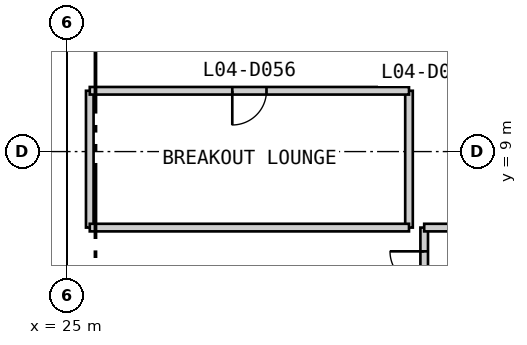
"""IFC4 building model, lengths in metres.
Left out: names, types, materials, properties, quantities, classifications, styles, units other than length and angle.
Written with IfcOpenShell. Run it as: python <this file> out.ifc"""

import sys

from ifc_helpers import new_model, si_unit, direction, frame, frame_2d, origin, place, context, subcontext, project, spatial, rectangle, extrude, element, fill, save


model = new_model("IFC4")
c1 = context("Model", 3, precision=1e-05, world=origin(), true_north=direction((0.0, 1.0)))
c2 = subcontext(c1, "Body", "Model", "MODEL_VIEW")
j1 = project(units=[si_unit("LENGTHUNIT", "METRE"), si_unit("PLANEANGLEUNIT", "RADIAN")], contexts=[c1])
p1 = place(None, origin())
s1 = spatial("IfcSite", under=j1, at=p1, CompositionType="ELEMENT")
p2 = place(p1, origin())
s2 = spatial("IfcBuilding", under=s1, at=p2, CompositionType="ELEMENT")
p3 = place(p2, frame((0.0, 0.0, 21.4)))
s3 = spatial("IfcBuildingStorey", under=s2, at=p3, CompositionType="ELEMENT", Elevation=21.4)
p4 = place(p3, frame((25.6, 7.0, 0.0), z_axis=(0.0, 0.0, 1.0), x_axis=(0.0, 1.0, 0.0)))
e1 = element("IfcWall", 1, at=p4, inside=s3, PredefinedType="PARTITIONING", context=c2, shape_type="SweptSolid", body=[
    extrude(rectangle(XDim=3.6, YDim=0.2, at=frame_2d((1.8, 0.0))), origin(), (0.0, 0.0, 1.0), 4.5),
])
p5 = place(p3, frame((34.0, 7.0, 0.0), z_axis=(0.0, 0.0, 1.0), x_axis=(0.0, 1.0, 0.0)))
e2 = element("IfcWall", 2, at=p5, inside=s3, PredefinedType="PARTITIONING", context=c2, shape_type="SweptSolid", body=[
    extrude(rectangle(XDim=3.6, YDim=0.2, at=frame_2d((1.8, 0.0))), origin(), (0.0, 0.0, 1.0), 3.843),
])
p6 = place(p3, frame((34.4, -7.25, 0.0), z_axis=(0.0, 0.0, 1.0), x_axis=(0.0, 1.0, 0.0)))
e3 = element("IfcWall", 3, at=p6, inside=s3, PredefinedType="PARTITIONING", context=c2, shape_type="SweptSolid", body=[
    extrude(rectangle(XDim=14.25, YDim=0.2, at=frame_2d((7.125, 0.0))), origin(), (0.0, 0.0, 1.0), 4.5),
])
p7 = place(p6, frame((2.45, 0.0, 0.0)))
e4 = element("IfcOpeningElement", 4, at=p7, cuts=e3, PredefinedType="OPENING", context=c2, shape_type="SweptSolid", body=[
    extrude(rectangle(XDim=1.8, YDim=2.4, at=frame_2d((0.9, 1.2))), frame((0.0, 0.11, 0.0), z_axis=(0.0, -1.0, 0.0), x_axis=(1.0, 0.0, 0.0)), (0.0, 0.0, 1.0), 0.22),
])
p8 = place(p6, frame((11.825, 0.0, 0.0)))
e5 = element("IfcOpeningElement", 5, at=p8, cuts=e3, PredefinedType="OPENING", context=c2, shape_type="SweptSolid", body=[
    extrude(rectangle(XDim=1.8, YDim=2.4, at=frame_2d((0.9, 1.2))), frame((0.0, 0.11, 0.0), z_axis=(0.0, -1.0, 0.0), x_axis=(1.0, 0.0, 0.0)), (0.0, 0.0, 1.0), 0.22),
])
p9 = place(p3, frame((25.6, 7.0, 0.0), z_axis=(0.0, 0.0, 1.0), x_axis=(1.0, 0.0, 0.0)))
e6 = element("IfcWall", 6, at=p9, inside=s3, PredefinedType="PARTITIONING", context=c2, shape_type="SweptSolid", body=[
    extrude(rectangle(XDim=8.4, YDim=0.2, at=frame_2d((4.2, 0.0))), origin(), (0.0, 0.0, 1.0), 4.5),
])
p10 = place(p3, frame((34.4, 7.0, 0.0), z_axis=(0.0, 0.0, 1.0), x_axis=(1.0, 0.0, 0.0)))
e7 = element("IfcWall", 7, at=p10, inside=s3, PredefinedType="PARTITIONING", context=c2, shape_type="SweptSolid", body=[
    extrude(rectangle(XDim=8.6, YDim=0.2, at=frame_2d((4.3, 0.0))), origin(), (0.0, 0.0, 1.0), 4.5),
])
p11 = place(p3, frame((25.6, 10.6, 0.0), z_axis=(0.0, 0.0, 1.0), x_axis=(1.0, 0.0, 0.0)))
e8 = element("IfcWall", 8, at=p11, inside=s3, PredefinedType="PARTITIONING", context=c2, shape_type="SweptSolid", body=[
    extrude(rectangle(XDim=8.4, YDim=0.2, at=frame_2d((4.2, 0.0))), origin(), (0.0, 0.0, 1.0), 4.5),
])
p12 = place(p11, frame((3.75, 0.0, 0.0)))
e9 = element("IfcOpeningElement", 9, at=p12, cuts=e8, PredefinedType="OPENING", context=c2, shape_type="SweptSolid", body=[
    extrude(rectangle(XDim=0.9, YDim=2.2, at=frame_2d((0.45, 1.1))), frame((0.0, 0.11, 0.0), z_axis=(0.0, -1.0, 0.0), x_axis=(1.0, 0.0, 0.0)), (0.0, 0.0, 1.0), 0.22),
])
p13 = place(p8, origin())
e10 = element("IfcDoor", 10, at=p13, inside=s3, OperationType="DOUBLE_DOOR_SINGLE_SWING", PredefinedType="DOOR", context=c2, shape_type="SweptSolid", body=[
    extrude(rectangle(XDim=1.8, YDim=2.4, at=frame_2d((0.9, 1.2))), frame((0.0, 0.025, 0.0), z_axis=(0.0, -1.0, 0.0), x_axis=(1.0, 0.0, 0.0)), (0.0, 0.0, 1.0), 0.05),
])
fill(e5, e10)
p14 = place(p12, frame((0.9, 0.0, 0.0), z_axis=(0.0, 0.0, 1.0), x_axis=(-1.0, 0.0, 0.0)))
e11 = element("IfcDoor", 11, at=p14, inside=s3, OperationType="SINGLE_SWING_RIGHT", PredefinedType="DOOR", context=c2, shape_type="SweptSolid", body=[
    extrude(rectangle(XDim=0.9, YDim=2.2, at=frame_2d((0.45, 1.1))), frame((0.0, 0.025, 0.0), z_axis=(0.0, -1.0, 0.0), x_axis=(1.0, 0.0, 0.0)), (0.0, 0.0, 1.0), 0.05),
])
fill(e9, e11)
save(model, sys.argv[1])
